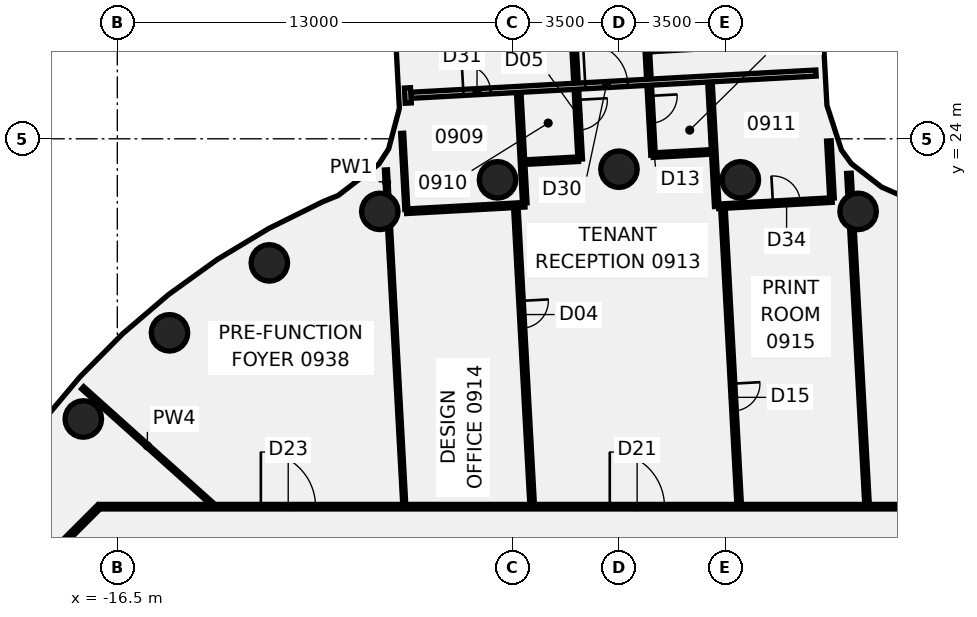
"""IFC4 building model, lengths in metres.
Left out: names, types, materials, properties, quantities, classifications, styles, units other than length and angle.
Written with IfcOpenShell. Run it as: python <this file> out.ifc"""

import sys

from ifc_helpers import new_model, si_unit, direction, frame, frame_2d, origin, origin_2d, place, context, subcontext, project, spatial, rectangle, circle, extrude, element, fill, save


model = new_model("IFC4")
c1 = context("Model", 3, precision=1e-05, world=origin(), true_north=direction((0.0, 1.0)))
c2 = subcontext(c1, "Body", "Model", "MODEL_VIEW")
j1 = project(units=[si_unit("LENGTHUNIT", "METRE"), si_unit("PLANEANGLEUNIT", "RADIAN")], contexts=[c1])
p1 = place(None, origin())
s1 = spatial("IfcSite", under=j1, at=p1, CompositionType="ELEMENT")
p2 = place(p1, origin())
s2 = spatial("IfcBuilding", under=s1, at=p2, CompositionType="ELEMENT")
p3 = place(p2, frame((0.0, 0.0, 45.25)))
s3 = spatial("IfcBuildingStorey", under=s2, at=p3, CompositionType="ELEMENT", Elevation=45.25)
for number, where, z_axis, x_axis in (
    (1, (7.866, 21.613, -0.14), (0.0, 0.0, 1.0), (1.0, 0.0, 0.0)),
    (2, (3.994, 22.651, -0.14), (0.0, 0.0, 1.0), (1.0, 0.0, 0.0)),
    (3, (0.0, 23.0, -0.14), (0.0, 0.0, 1.0), (1.0, 0.0, 0.0)),
    (4, (-3.994, 22.651, -0.14), (0.0, 0.0, 1.0), (1.0, 0.0, 0.0)),
    (5, (-7.866, 21.613, -0.14), (0.0, 0.0, 1.0), (1.0, 0.0, 0.0)),
    (6, (-11.5, 19.919, -0.14), (0.0, 0.0, 1.0), (1.0, 0.0, 0.0)),
    (7, (-14.784, 17.619, -0.14), (0.0, 0.0, 1.0), (1.0, 0.0, 0.0)),
    (8, (-17.619, 14.784, -0.14), (0.0, 0.0, 1.0), (1.0, 0.0, 0.0)),
):
    element("IfcColumn", number, at=place(p3, frame(where, z_axis=z_axis, x_axis=x_axis)), inside=s3, PredefinedType="COLUMN", context=c2, shape_type="SweptSolid", body=[
        extrude(circle(Radius=0.6, at=origin_2d()), origin(), (0.0, 0.0, 1.0), 3.75),
    ])
p4 = place(p3, frame((-7.665, 22.976, 0.0), z_axis=(0.0, 0.0, 1.0), x_axis=(0.05446449316, -0.998515707931, 0.0)))
e9 = element("IfcWall", 9, at=p4, inside=s3, PredefinedType="PARTITIONING", context=c2, shape_type="SweptSolid", body=[
    extrude(rectangle(XDim=0.82, YDim=0.1, at=frame_2d((0.41, 0.0))), origin(), (0.0, 0.0, 1.0), 3.01),
])
p5 = place(p3, frame((-7.561, 21.085, 0.0), z_axis=(0.0, 0.0, 1.0), x_axis=(0.054713906198, -0.998502072341, 0.0)))
e10 = element("IfcWall", 10, at=p5, inside=s3, PredefinedType="PARTITIONING", context=c2, shape_type="SweptSolid", body=[
    extrude(rectangle(XDim=9.138, YDim=0.1, at=frame_2d((4.569, 0.0))), origin(), (0.0, 0.0, 1.0), 3.01),
])
p6 = place(p3, frame((-7.13, 24.18, 0.0), z_axis=(0.0, 0.0, 1.0), x_axis=(0.05444507148, -0.998516767106, 0.0)))
e11 = element("IfcWall", 11, at=p6, inside=s3, PredefinedType="PARTITIONING", context=c2, shape_type="SweptSolid", body=[
    extrude(rectangle(XDim=2.507, YDim=0.1, at=frame_2d((1.253, 0.0))), origin(), (0.0, 0.0, 1.0), 3.01),
])
p7 = place(p3, frame((-3.391, 21.749, 0.0), z_axis=(0.0, 0.0, 1.0), x_axis=(0.054686598067, -0.998503568342, 0.0)))
e12 = element("IfcWall", 12, at=p7, inside=s3, PredefinedType="PARTITIONING", context=c2, shape_type="SweptSolid", body=[
    extrude(rectangle(XDim=9.804, YDim=0.15, at=frame_2d((4.902, 0.0))), origin(), (0.0, 0.0, 1.0), 3.01),
])
p8 = place(p7, frame((3.085, 0.0, 0.0)))
e13 = element("IfcOpeningElement", 13, at=p8, cuts=e12, PredefinedType="OPENING", context=c2, shape_type="SweptSolid", body=[
    extrude(rectangle(XDim=0.9, YDim=2.1, at=frame_2d((0.45, 1.05))), frame((0.0, 0.085, 0.0), z_axis=(0.0, -1.0, 0.0), x_axis=(1.0, 0.0, 0.0)), (0.0, 0.0, 1.0), 0.17),
])
p9 = place(p3, frame((-3.298, 25.535, 0.0), z_axis=(0.0, 0.0, 1.0), x_axis=(0.054703313237, -0.998502652736, 0.0)))
e14 = element("IfcWall", 14, at=p9, inside=s3, PredefinedType="PARTITIONING", context=c2, shape_type="SweptSolid", body=[
    extrude(rectangle(XDim=3.651, YDim=0.15, at=frame_2d((1.825, 0.0))), origin(), (0.0, 0.0, 1.0), 3.01),
])
p10 = place(p3, frame((-2.14, 39.144, 0.0), z_axis=(0.0, 0.0, 1.0), x_axis=(0.054653700015, -0.998505369577, 0.0)))
e15 = element("IfcWall", 15, at=p10, inside=s3, PredefinedType="PARTITIONING", context=c2, shape_type="SweptSolid", body=[
    extrude(rectangle(XDim=15.836, YDim=0.15, at=frame_2d((7.918, 0.0))), origin(), (0.0, 0.0, 1.0), 3.01),
])
p11 = place(p10, frame((13.885, 0.0, 0.0)))
e16 = element("IfcOpeningElement", 16, at=p11, cuts=e15, PredefinedType="OPENING", context=c2, shape_type="SweptSolid", body=[
    extrude(rectangle(XDim=1.0, YDim=2.1, at=frame_2d((0.5, 1.05))), frame((0.0, 0.085, 0.0), z_axis=(0.0, -1.0, 0.0), x_axis=(1.0, 0.0, 0.0)), (0.0, 0.0, 1.0), 0.17),
])
p12 = place(p10, frame((6.836, 0.0, 0.0)))
e17 = element("IfcOpeningElement", 17, at=p12, cuts=e15, PredefinedType="OPENING", context=c2, shape_type="SweptSolid", body=[
    extrude(rectangle(XDim=0.9, YDim=2.1, at=frame_2d((0.45, 1.05))), frame((0.0, 0.085, 0.0), z_axis=(0.0, -1.0, 0.0), x_axis=(1.0, 0.0, 0.0)), (0.0, 0.0, 1.0), 0.17),
])
p13 = place(p10, frame((1.285, 0.0, 0.0)))
e18 = element("IfcOpeningElement", 18, at=p13, cuts=e15, PredefinedType="OPENING", context=c2, shape_type="SweptSolid", body=[
    extrude(rectangle(XDim=0.9, YDim=2.1, at=frame_2d((0.45, 1.05))), frame((0.0, 0.085, 0.0), z_axis=(0.0, -1.0, 0.0), x_axis=(1.0, 0.0, 0.0)), (0.0, 0.0, 1.0), 0.17),
])
p14 = place(p10, frame((9.835, 0.0, 0.0)))
e19 = element("IfcOpeningElement", 19, at=p14, cuts=e15, PredefinedType="OPENING", context=c2, shape_type="SweptSolid", body=[
    extrude(rectangle(XDim=1.8, YDim=2.1, at=frame_2d((0.9, 1.05))), frame((0.0, 0.085, 0.0), z_axis=(0.0, -1.0, 0.0), x_axis=(1.0, 0.0, 0.0)), (0.0, 0.0, 1.0), 0.17),
])
p15 = place(p3, frame((0.938, 26.819, 0.0), z_axis=(0.0, 0.0, 1.0), x_axis=(0.05464892536, -0.998505630909, 0.0)))
e20 = element("IfcWall", 20, at=p15, inside=s3, PredefinedType="PARTITIONING", context=c2, shape_type="SweptSolid", body=[
    extrude(rectangle(XDim=3.36, YDim=0.15, at=frame_2d((1.68, 0.0))), origin(), (0.0, 0.0, 1.0), 3.01),
])
p16 = place(p15, frame((1.41, 0.0, 0.0)))
e21 = element("IfcOpeningElement", 21, at=p16, cuts=e20, PredefinedType="OPENING", context=c2, shape_type="SweptSolid", body=[
    extrude(rectangle(XDim=0.9, YDim=2.1, at=frame_2d((0.45, 1.05))), frame((0.0, 0.085, 0.0), z_axis=(0.0, -1.0, 0.0), x_axis=(1.0, 0.0, 0.0)), (0.0, 0.0, 1.0), 0.17),
])
p17 = place(p3, frame((2.992, 25.879, 0.0), z_axis=(0.0, 0.0, 1.0), x_axis=(0.054598038501, -0.998508414683, 0.0)))
e22 = element("IfcWall", 22, at=p17, inside=s3, PredefinedType="PARTITIONING", context=c2, shape_type="SweptSolid", body=[
    extrude(rectangle(XDim=4.109, YDim=0.15, at=frame_2d((2.055, 0.0))), origin(), (0.0, 0.0, 1.0), 3.01),
])
p18 = place(p3, frame((3.421, 21.722, 0.0), z_axis=(0.0, 0.0, 1.0), x_axis=(0.054612518659, -0.998507622808, 0.0)))
e23 = element("IfcWall", 23, at=p18, inside=s3, PredefinedType="PARTITIONING", context=c2, shape_type="SweptSolid", body=[
    extrude(rectangle(XDim=9.777, YDim=0.15, at=frame_2d((4.888, 0.0))), origin(), (0.0, 0.0, 1.0), 3.01),
])
p19 = place(p18, frame((5.785, 0.0, 0.0)))
e24 = element("IfcOpeningElement", 24, at=p19, cuts=e23, PredefinedType="OPENING", context=c2, shape_type="SweptSolid", body=[
    extrude(rectangle(XDim=0.9, YDim=2.1, at=frame_2d((0.45, 1.05))), frame((0.0, 0.085, 0.0), z_axis=(0.0, -1.0, 0.0), x_axis=(1.0, 0.0, 0.0)), (0.0, 0.0, 1.0), 0.17),
])
p20 = place(p3, frame((6.905, 23.93, 0.0), z_axis=(0.0, 0.0, 1.0), x_axis=(0.054387027717, -0.998519930305, 0.0)))
e25 = element("IfcWall", 25, at=p20, inside=s3, PredefinedType="PARTITIONING", context=c2, shape_type="SweptSolid", body=[
    extrude(rectangle(XDim=1.885, YDim=0.15, at=frame_2d((0.943, 0.0))), origin(), (0.0, 0.0, 1.0), 3.01),
])
p21 = place(p3, frame((7.564, 22.864, 0.0), z_axis=(0.0, 0.0, 1.0), x_axis=(0.05446449316, -0.998515707931, 0.0)))
e26 = element("IfcWall", 26, at=p21, inside=s3, PredefinedType="PARTITIONING", context=c2, shape_type="SweptSolid", body=[
    extrude(rectangle(XDim=0.713, YDim=0.15, at=frame_2d((0.356, 0.0))), origin(), (0.0, 0.0, 1.0), 3.01),
])
p22 = place(p3, frame((7.663, 21.058, 0.0), z_axis=(0.0, 0.0, 1.0), x_axis=(0.054635960393, -0.998506340406, 0.0)))
e27 = element("IfcWall", 27, at=p22, inside=s3, PredefinedType="PARTITIONING", context=c2, shape_type="SweptSolid", body=[
    extrude(rectangle(XDim=9.111, YDim=0.15, at=frame_2d((4.556, 0.0))), origin(), (0.0, 0.0, 1.0), 3.01),
])
p23 = place(p3, frame((-17.64, 15.808, 0.0), z_axis=(0.0, 0.0, 1.0), x_axis=(0.74470485746, -0.667393943092, 0.0)))
e28 = element("IfcWall", 28, at=p23, inside=s3, PredefinedType="PARTITIONING", context=c2, shape_type="SweptSolid", body=[
    extrude(rectangle(XDim=5.716, YDim=0.1, at=frame_2d((2.858, 0.0))), origin(), (0.0, 0.0, 1.0), 3.01),
])
p24 = place(p3, frame((-17.065, 11.9, 0.0), z_axis=(0.0, 0.0, 1.0), x_axis=(1.0, 0.0, 0.0)))
e29 = element("IfcWall", 29, at=p24, inside=s3, PredefinedType="PARTITIONING", context=c2, shape_type="SweptSolid", body=[
    extrude(rectangle(XDim=34.165, YDim=0.15, at=frame_2d((17.083, 0.0))), origin(), (0.0, 0.0, 1.0), 3.01),
])
p25 = place(p24, frame((16.763, 0.0, 0.0)))
e30 = element("IfcOpeningElement", 30, at=p25, cuts=e29, PredefinedType="OPENING", context=c2, shape_type="SweptSolid", body=[
    extrude(rectangle(XDim=1.8, YDim=2.1, at=frame_2d((0.9, 1.05))), frame((0.0, 0.085, 0.0), z_axis=(0.0, -1.0, 0.0), x_axis=(1.0, 0.0, 0.0)), (0.0, 0.0, 1.0), 0.17),
])
p26 = place(p24, frame((30.579, 0.0, 0.0)))
e31 = element("IfcOpeningElement", 31, at=p26, cuts=e29, PredefinedType="OPENING", context=c2, shape_type="SweptSolid", body=[
    extrude(rectangle(XDim=1.8, YDim=2.1, at=frame_2d((0.9, 1.05))), frame((0.0, 0.085, 0.0), z_axis=(0.0, -1.0, 0.0), x_axis=(1.0, 0.0, 0.0)), (0.0, 0.0, 1.0), 0.17),
])
p27 = place(p24, frame((5.286, 0.0, 0.0)))
e32 = element("IfcOpeningElement", 32, at=p27, cuts=e29, PredefinedType="OPENING", context=c2, shape_type="SweptSolid", body=[
    extrude(rectangle(XDim=1.8, YDim=2.1, at=frame_2d((0.9, 1.05))), frame((0.0, 0.085, 0.0), z_axis=(0.0, -1.0, 0.0), x_axis=(1.0, 0.0, 0.0)), (0.0, 0.0, 1.0), 0.17),
])
p28 = place(p3, frame((-6.99, 21.617, 0.0), z_axis=(0.0, 0.0, 1.0), x_axis=(0.998502807965, 0.054700479764, 0.0)))
e33 = element("IfcWall", 33, at=p28, inside=s3, PredefinedType="PARTITIONING", context=c2, shape_type="SweptSolid", body=[
    extrude(rectangle(XDim=3.901, YDim=0.15, at=frame_2d((1.95, 0.0))), origin(), (0.0, 0.0, 1.0), 3.01),
])
p29 = place(p3, frame((-6.849, 25.43, 0.0), z_axis=(0.0, 0.0, 1.0), x_axis=(0.998496042517, 0.054823836773, 0.0)))
e34 = element("IfcWall", 34, at=p29, inside=s3, PredefinedType="PARTITIONING", context=c2, shape_type="SweptSolid", body=[
    extrude(rectangle(XDim=13.351, YDim=0.2, at=frame_2d((6.675, 0.0))), origin(), (0.0, 0.0, 1.0), 3.01),
])
p30 = place(p29, frame((5.751, 0.0, 0.0)))
e35 = element("IfcOpeningElement", 35, at=p30, cuts=e34, PredefinedType="OPENING", context=c2, shape_type="SweptSolid", body=[
    extrude(rectangle(XDim=1.4, YDim=2.1, at=frame_2d((0.7, 1.05))), frame((0.0, 0.11, 0.0), z_axis=(0.0, -1.0, 0.0), x_axis=(1.0, 0.0, 0.0)), (0.0, 0.0, 1.0), 0.22),
])
p31 = place(p29, frame((1.734, 0.0, 0.0)))
e36 = element("IfcOpeningElement", 36, at=p31, cuts=e34, PredefinedType="OPENING", context=c2, shape_type="SweptSolid", body=[
    extrude(rectangle(XDim=0.9, YDim=2.1, at=frame_2d((0.45, 1.05))), frame((0.0, 0.11, 0.0), z_axis=(0.0, -1.0, 0.0), x_axis=(1.0, 0.0, 0.0)), (0.0, 0.0, 1.0), 0.22),
])
p32 = place(p3, frame((-3.107, 23.232, 0.0), z_axis=(0.0, 0.0, 1.0), x_axis=(0.998507808704, 0.054609119721, 0.0)))
e37 = element("IfcWall", 37, at=p32, inside=s3, PredefinedType="PARTITIONING", context=c2, shape_type="SweptSolid", body=[
    extrude(rectangle(XDim=1.775, YDim=0.15, at=frame_2d((0.887, 0.0))), origin(), (0.0, 0.0, 1.0), 3.01),
])
p33 = place(p3, frame((1.122, 23.463, 0.0), z_axis=(0.0, 0.0, 1.0), x_axis=(0.998497803105, 0.054791762112, 0.0)))
e38 = element("IfcWall", 38, at=p33, inside=s3, PredefinedType="PARTITIONING", context=c2, shape_type="SweptSolid", body=[
    extrude(rectangle(XDim=1.934, YDim=0.15, at=frame_2d((0.967, 0.0))), origin(), (0.0, 0.0, 1.0), 3.01),
])
p34 = place(p3, frame((3.277, 21.779, 0.0), z_axis=(0.0, 0.0, 1.0), x_axis=(0.998491728181, 0.054902356548, 0.0)))
e39 = element("IfcWall", 39, at=p34, inside=s3, PredefinedType="PARTITIONING", context=c2, shape_type="SweptSolid", body=[
    extrude(rectangle(XDim=3.74, YDim=0.15, at=frame_2d((1.87, 0.0))), origin(), (0.0, 0.0, 1.0), 3.01),
])
p35 = place(p34, frame((1.79, 0.0, 0.0)))
e40 = element("IfcOpeningElement", 40, at=p35, cuts=e39, PredefinedType="OPENING", context=c2, shape_type="SweptSolid", body=[
    extrude(rectangle(XDim=0.9, YDim=2.1, at=frame_2d((0.45, 1.05))), frame((0.0, 0.085, 0.0), z_axis=(0.0, -1.0, 0.0), x_axis=(1.0, 0.0, 0.0)), (0.0, 0.0, 1.0), 0.17),
])
p36 = place(p3, frame((-18.872, 10.128, 0.0), z_axis=(0.0, 0.0, 1.0), x_axis=(0.707106781187, 0.707106781187, 0.0)))
e41 = element("IfcWall", 41, at=p36, inside=s3, PredefinedType="PARTITIONING", context=c2, shape_type="SweptSolid", body=[
    extrude(rectangle(XDim=2.505, YDim=0.15, at=frame_2d((1.253, 0.0))), origin(), (0.0, 0.0, 1.0), 3.01),
])
p37 = place(p3, frame((-6.957, 25.675, 0.0), z_axis=(0.0, 0.0, 1.0), x_axis=(0.052712536951, -0.998609727796, 0.0)))
e42 = element("IfcWall", 42, at=p37, inside=s3, PredefinedType="PARTITIONING", context=c2, shape_type="SweptSolid", body=[
    extrude(rectangle(XDim=0.5, YDim=0.2, at=frame_2d((0.25, 0.0))), origin(), (0.0, 0.0, 1.0), 3.01),
])
p38 = place(p3, frame((1.036, 26.864, -0.14), z_axis=(0.0, 0.0, 1.0), x_axis=(-0.05469502821, 0.9985031066, 0.0)))
e43 = element("IfcWall", 43, at=p38, inside=s3, PredefinedType="SHEAR", context=c2, shape_type="SweptSolid", body=[
    extrude(rectangle(XDim=6.7, YDim=0.2, at=frame_2d((3.35, 0.0))), origin(), (0.0, 0.0, 1.0), 3.15),
])
p39 = place(p38, frame((0.35, 0.0, 0.0)))
e44 = element("IfcOpeningElement", 44, at=p39, cuts=e43, PredefinedType="OPENING", context=c2, shape_type="SweptSolid", body=[
    extrude(rectangle(XDim=1.0, YDim=2.1, at=frame_2d((0.5, 1.05))), frame((0.0, 0.11, 0.0), z_axis=(0.0, -1.0, 0.0), x_axis=(1.0, 0.0, 0.0)), (0.0, 0.0, 1.0), 0.22),
])
p40 = place(p8, frame((0.9, 0.0, 0.0), z_axis=(0.0, 0.0, 1.0), x_axis=(-1.0, 0.0, 0.0)))
e45 = element("IfcDoor", 45, at=p40, inside=s3, OperationType="SINGLE_SWING_LEFT", PredefinedType="DOOR", context=c2, shape_type="SweptSolid", body=[
    extrude(rectangle(XDim=0.9, YDim=2.1, at=frame_2d((0.45, 1.05))), frame((0.0, 0.025, 0.0), z_axis=(0.0, -1.0, 0.0), x_axis=(1.0, 0.0, 0.0)), (0.0, 0.0, 1.0), 0.05),
])
fill(e13, e45)
p41 = place(p11, frame((1.0, 0.0, 0.0), z_axis=(0.0, 0.0, 1.0), x_axis=(-1.0, 0.0, 0.0)))
e46 = element("IfcDoor", 46, at=p41, inside=s3, OperationType="SINGLE_SWING_RIGHT", PredefinedType="DOOR", context=c2, shape_type="SweptSolid", body=[
    extrude(rectangle(XDim=1.0, YDim=2.1, at=frame_2d((0.5, 1.05))), frame((0.0, 0.025, 0.0), z_axis=(0.0, -1.0, 0.0), x_axis=(1.0, 0.0, 0.0)), (0.0, 0.0, 1.0), 0.05),
])
fill(e16, e46)
p42 = place(p16, origin())
e47 = element("IfcDoor", 47, at=p42, inside=s3, OperationType="SINGLE_SWING_LEFT", PredefinedType="DOOR", context=c2, shape_type="SweptSolid", body=[
    extrude(rectangle(XDim=0.9, YDim=2.1, at=frame_2d((0.45, 1.05))), frame((0.0, 0.025, 0.0), z_axis=(0.0, -1.0, 0.0), x_axis=(1.0, 0.0, 0.0)), (0.0, 0.0, 1.0), 0.05),
])
fill(e21, e47)
p43 = place(p19, origin())
e48 = element("IfcDoor", 48, at=p43, inside=s3, OperationType="SINGLE_SWING_LEFT", PredefinedType="DOOR", context=c2, shape_type="SweptSolid", body=[
    extrude(rectangle(XDim=0.9, YDim=2.1, at=frame_2d((0.45, 1.05))), frame((0.0, 0.025, 0.0), z_axis=(0.0, -1.0, 0.0), x_axis=(1.0, 0.0, 0.0)), (0.0, 0.0, 1.0), 0.05),
])
fill(e24, e48)
p44 = place(p25, frame((1.8, 0.0, 0.0), z_axis=(0.0, 0.0, 1.0), x_axis=(-1.0, 0.0, 0.0)))
e49 = element("IfcDoor", 49, at=p44, inside=s3, OperationType="DOUBLE_DOOR_SINGLE_SWING", PredefinedType="DOOR", context=c2, shape_type="SweptSolid", body=[
    extrude(rectangle(XDim=1.8, YDim=2.1, at=frame_2d((0.9, 1.05))), frame((0.0, 0.025, 0.0), z_axis=(0.0, -1.0, 0.0), x_axis=(1.0, 0.0, 0.0)), (0.0, 0.0, 1.0), 0.05),
])
fill(e30, e49)
p45 = place(p27, origin())
e50 = element("IfcDoor", 50, at=p45, inside=s3, OperationType="DOUBLE_DOOR_SINGLE_SWING", PredefinedType="DOOR", context=c2, shape_type="SweptSolid", body=[
    extrude(rectangle(XDim=1.8, YDim=2.1, at=frame_2d((0.9, 1.05))), frame((0.0, 0.025, 0.0), z_axis=(0.0, -1.0, 0.0), x_axis=(1.0, 0.0, 0.0)), (0.0, 0.0, 1.0), 0.05),
])
fill(e32, e50)
p46 = place(p30, frame((1.4, 0.0, 0.0), z_axis=(0.0, 0.0, 1.0), x_axis=(-1.0, 0.0, 0.0)))
e51 = element("IfcDoor", 51, at=p46, inside=s3, OperationType="DOUBLE_DOOR_SINGLE_SWING", PredefinedType="DOOR", context=c2, shape_type="SweptSolid", body=[
    extrude(rectangle(XDim=1.4, YDim=2.1, at=frame_2d((0.7, 1.05))), frame((0.0, 0.025, 0.0), z_axis=(0.0, -1.0, 0.0), x_axis=(1.0, 0.0, 0.0)), (0.0, 0.0, 1.0), 0.05),
])
fill(e35, e51)
p47 = place(p31, frame((0.9, 0.0, 0.0), z_axis=(0.0, 0.0, 1.0), x_axis=(-1.0, 0.0, 0.0)))
e52 = element("IfcDoor", 52, at=p47, inside=s3, OperationType="SINGLE_SWING_LEFT", PredefinedType="DOOR", context=c2, shape_type="SweptSolid", body=[
    extrude(rectangle(XDim=0.9, YDim=2.1, at=frame_2d((0.45, 1.05))), frame((0.0, 0.025, 0.0), z_axis=(0.0, -1.0, 0.0), x_axis=(1.0, 0.0, 0.0)), (0.0, 0.0, 1.0), 0.05),
])
fill(e36, e52)
p48 = place(p35, origin())
e53 = element("IfcDoor", 53, at=p48, inside=s3, OperationType="SINGLE_SWING_LEFT", PredefinedType="DOOR", context=c2, shape_type="SweptSolid", body=[
    extrude(rectangle(XDim=0.9, YDim=2.1, at=frame_2d((0.45, 1.05))), frame((0.0, 0.025, 0.0), z_axis=(0.0, -1.0, 0.0), x_axis=(1.0, 0.0, 0.0)), (0.0, 0.0, 1.0), 0.05),
])
fill(e40, e53)
save(model, sys.argv[1])
